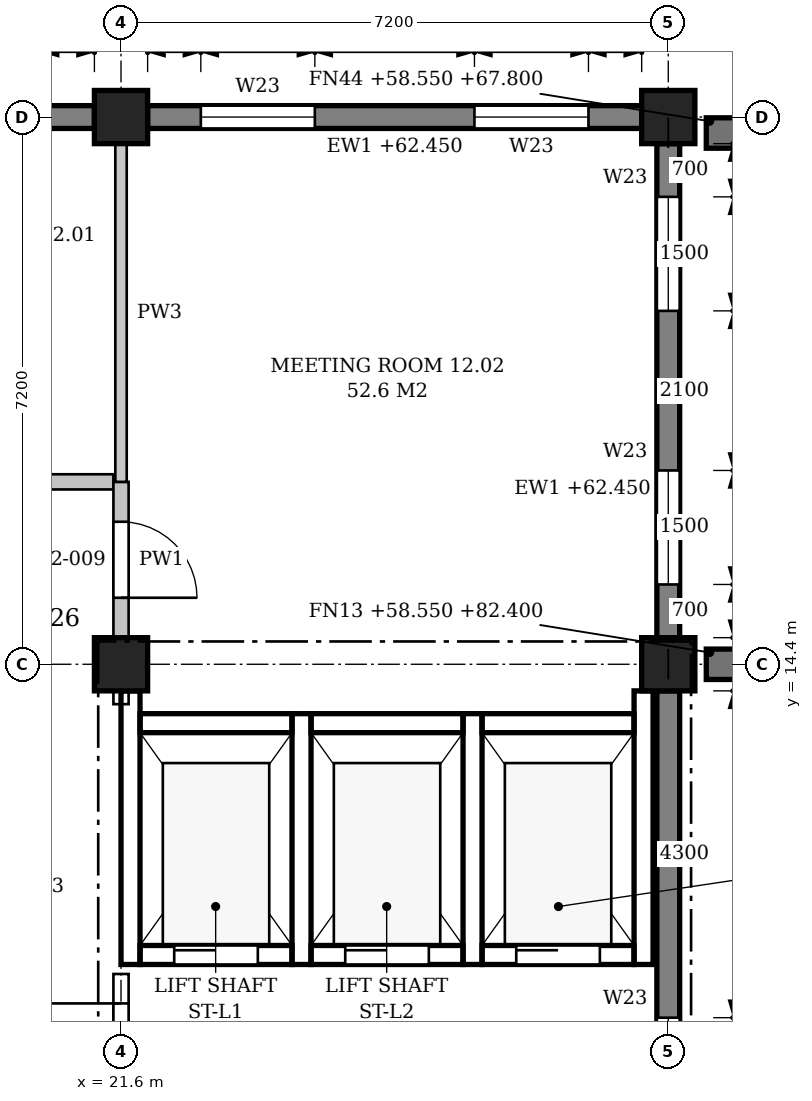
"""IFC4 building model, lengths in metres.
Left out: names, types, materials, properties, quantities, classifications, styles, units other than length and angle.
Written with IfcOpenShell. Run it as: python <this file> out.ifc"""

import sys

from ifc_helpers import new_model, si_unit, direction, frame, frame_2d, origin, origin_2d, place, context, subcontext, project, spatial, polyline, rectangle, outline, extrude, element, fill, save


model = new_model("IFC4")
c1 = context("Model", 3, precision=1e-05, world=origin(), true_north=direction((0.0, 1.0)))
c2 = subcontext(c1, "Body", "Model", "MODEL_VIEW")
j1 = project(units=[si_unit("LENGTHUNIT", "METRE"), si_unit("PLANEANGLEUNIT", "RADIAN")], contexts=[c1])
p1 = place(None, origin())
s1 = spatial("IfcSite", under=j1, at=p1, CompositionType="ELEMENT")
p2 = place(p1, origin())
s2 = spatial("IfcBuilding", under=s1, at=p2, CompositionType="ELEMENT")
p3 = place(p2, frame((0.0, 0.0, 58.8)))
s3 = spatial("IfcBuildingStorey", under=s2, at=p3, CompositionType="ELEMENT", Elevation=58.8)
for number, where, z_axis, x_axis in (
    (1, (21.6, 14.4, 0.0), (0.0, 0.0, 1.0), (1.0, 0.0, 0.0)),
    (2, (21.6, 21.6, 0.0), (0.0, 0.0, 1.0), (1.0, 0.0, 0.0)),
    (3, (28.8, 14.4, 0.0), (0.0, 0.0, 1.0), (1.0, 0.0, 0.0)),
    (4, (28.8, 21.6, 0.0), (0.0, 0.0, 1.0), (1.0, 0.0, 0.0)),
):
    element("IfcColumn", number, at=place(p3, frame(where, z_axis=z_axis, x_axis=x_axis)), inside=s3, PredefinedType="COLUMN", context=c2, shape_type="SweptSolid", body=[
        extrude(rectangle(XDim=0.7, YDim=0.7, at=origin_2d()), origin(), (0.0, 0.0, 1.0), 4.5),
    ])
p4 = place(p3, frame((28.8, 7.55, 0.0), z_axis=(0.0, 0.0, 1.0), x_axis=(0.0, 1.0, 0.0)))
e5 = element("IfcWall", 5, at=p4, inside=s3, PredefinedType="STANDARD", context=c2, shape_type="SweptSolid", body=[
    extrude(rectangle(XDim=6.5, YDim=0.3, at=frame_2d((3.25, 0.0))), origin(), (0.0, 0.0, 1.0), 3.65),
])
p5 = place(p4, frame((0.7, 0.0, 0.9)))
e6 = element("IfcOpeningElement", 6, at=p5, cuts=e5, PredefinedType="OPENING", context=c2, shape_type="SweptSolid", body=[
    extrude(outline(polyline([(0.0, 0.0), (1.5, 0.0), (1.5, 1.95), (0.75, 2.7), (0.0, 1.95), (0.0, 0.0)])), frame((0.0, 0.16, 0.0), z_axis=(0.0, -1.0, 0.0), x_axis=(1.0, 0.0, 0.0)), (0.0, 0.0, 1.0), 0.32),
])
p6 = place(p3, frame((28.8, 14.75, 0.0), z_axis=(0.0, 0.0, 1.0), x_axis=(0.0, 1.0, 0.0)))
e7 = element("IfcWall", 7, at=p6, inside=s3, PredefinedType="STANDARD", context=c2, shape_type="SweptSolid", body=[
    extrude(rectangle(XDim=6.5, YDim=0.3, at=frame_2d((3.25, 0.0))), origin(), (0.0, 0.0, 1.0), 3.65),
])
p7 = place(p6, frame((0.7, 0.0, 0.9)))
e8 = element("IfcOpeningElement", 8, at=p7, cuts=e7, PredefinedType="OPENING", context=c2, shape_type="SweptSolid", body=[
    extrude(outline(polyline([(0.0, 0.0), (1.5, 0.0), (1.5, 1.95), (0.75, 2.7), (0.0, 1.95), (0.0, 0.0)])), frame((0.0, 0.16, 0.0), z_axis=(0.0, -1.0, 0.0), x_axis=(1.0, 0.0, 0.0)), (0.0, 0.0, 1.0), 0.32),
])
p8 = place(p6, frame((4.3, 0.0, 0.9)))
e9 = element("IfcOpeningElement", 9, at=p8, cuts=e7, PredefinedType="OPENING", context=c2, shape_type="SweptSolid", body=[
    extrude(outline(polyline([(0.0, 0.0), (1.5, 0.0), (1.5, 1.95), (0.75, 2.7), (0.0, 1.95), (0.0, 0.0)])), frame((0.0, 0.16, 0.0), z_axis=(0.0, -1.0, 0.0), x_axis=(1.0, 0.0, 0.0)), (0.0, 0.0, 1.0), 0.32),
])
p9 = place(p3, frame((28.45, 21.6, 0.0), z_axis=(0.0, 0.0, 1.0), x_axis=(-1.0, 0.0, 0.0)))
e10 = element("IfcWall", 10, at=p9, inside=s3, PredefinedType="STANDARD", context=c2, shape_type="SweptSolid", body=[
    extrude(rectangle(XDim=6.5, YDim=0.3, at=frame_2d((3.25, 0.0))), origin(), (0.0, 0.0, 1.0), 3.65),
])
p10 = place(p9, frame((0.7, 0.0, 0.9)))
e11 = element("IfcOpeningElement", 11, at=p10, cuts=e10, PredefinedType="OPENING", context=c2, shape_type="SweptSolid", body=[
    extrude(outline(polyline([(0.0, 0.0), (1.5, 0.0), (1.5, 1.95), (0.75, 2.7), (0.0, 1.95), (0.0, 0.0)])), frame((0.0, 0.16, 0.0), z_axis=(0.0, -1.0, 0.0), x_axis=(1.0, 0.0, 0.0)), (0.0, 0.0, 1.0), 0.32),
])
p11 = place(p9, frame((4.3, 0.0, 0.9)))
e12 = element("IfcOpeningElement", 12, at=p11, cuts=e10, PredefinedType="OPENING", context=c2, shape_type="SweptSolid", body=[
    extrude(outline(polyline([(0.0, 0.0), (1.5, 0.0), (1.5, 1.95), (0.75, 2.7), (0.0, 1.95), (0.0, 0.0)])), frame((0.0, 0.16, 0.0), z_axis=(0.0, -1.0, 0.0), x_axis=(1.0, 0.0, 0.0)), (0.0, 0.0, 1.0), 0.32),
])
p12 = place(p3, frame((21.25, 21.6, 0.0), z_axis=(0.0, 0.0, 1.0), x_axis=(-1.0, 0.0, 0.0)))
e13 = element("IfcWall", 13, at=p12, inside=s3, PredefinedType="STANDARD", context=c2, shape_type="SweptSolid", body=[
    extrude(rectangle(XDim=6.5, YDim=0.3, at=frame_2d((3.25, 0.0))), origin(), (0.0, 0.0, 1.0), 3.65),
])
p13 = place(p12, frame((0.7, 0.0, 0.9)))
e14 = element("IfcOpeningElement", 14, at=p13, cuts=e13, PredefinedType="OPENING", context=c2, shape_type="SweptSolid", body=[
    extrude(outline(polyline([(0.0, 0.0), (1.5, 0.0), (1.5, 1.95), (0.75, 2.7), (0.0, 1.95), (0.0, 0.0)])), frame((0.0, 0.16, 0.0), z_axis=(0.0, -1.0, 0.0), x_axis=(1.0, 0.0, 0.0)), (0.0, 0.0, 1.0), 0.32),
])
p14 = place(p12, frame((4.3, 0.0, 0.9)))
e15 = element("IfcOpeningElement", 15, at=p14, cuts=e13, PredefinedType="OPENING", context=c2, shape_type="SweptSolid", body=[
    extrude(outline(polyline([(0.0, 0.0), (1.5, 0.0), (1.5, 1.95), (0.75, 2.7), (0.0, 1.95), (0.0, 0.0)])), frame((0.0, 0.16, 0.0), z_axis=(0.0, -1.0, 0.0), x_axis=(1.0, 0.0, 0.0)), (0.0, 0.0, 1.0), 0.32),
])
p15 = place(p3, frame((29.3, 14.4, -0.25), z_axis=(0.0, 0.0, 1.0), x_axis=(1.0, 0.0, 0.0)))
e16 = element("IfcWall", 16, at=p15, inside=s3, PredefinedType="POLYGONAL", context=c2, shape_type="SweptSolid", body=[
    extrude(outline(polyline([(0.5, 0.0), (0.5, 23.85), (0.0, 23.85), (0.0, 0.0), (0.5, 0.0)])), frame((0.0, 0.2, 0.0), z_axis=(0.0, -1.0, 0.0), x_axis=(1.0, 0.0, 0.0)), (0.0, 0.0, 1.0), 0.4),
])
p16 = place(p3, frame((29.3, 21.39, -0.25), z_axis=(0.0, 0.0, 1.0), x_axis=(1.0, 0.0, 0.0)))
e17 = element("IfcWall", 17, at=p16, inside=s3, PredefinedType="POLYGONAL", context=c2, shape_type="SweptSolid", body=[
    extrude(outline(polyline([(0.5, 0.0), (0.5, 8.725), (0.15, 9.25), (0.0, 9.25), (0.0, 0.0), (0.5, 0.0)])), frame((0.0, 0.2, 0.0), z_axis=(0.0, -1.0, 0.0), x_axis=(1.0, 0.0, 0.0)), (0.0, 0.0, 1.0), 0.4),
])
p17 = place(p3, frame((21.725, 10.45, -0.25), z_axis=(0.0, 0.0, 1.0), x_axis=(0.0, 1.0, 0.0)))
e18 = element("IfcWall", 18, at=p17, inside=s3, PredefinedType="SHEAR", context=c2, shape_type="SweptSolid", body=[
    extrude(rectangle(XDim=3.6, YDim=0.25, at=frame_2d((1.8, 0.0))), origin(), (0.0, 0.0, 1.0), 3.85),
])
for number, where, z_axis, x_axis in (
    (19, (23.975, 10.45, -0.25), (0.0, 0.0, 1.0), (0.0, 1.0, 0.0)),
    (20, (26.225, 10.45, -0.25), (0.0, 0.0, 1.0), (0.0, 1.0, 0.0)),
):
    element("IfcWall", number, at=place(p3, frame(where, z_axis=z_axis, x_axis=x_axis)), inside=s3, PredefinedType="SHEAR", context=c2, shape_type="SweptSolid", body=[
        extrude(rectangle(XDim=3.3, YDim=0.25, at=frame_2d((1.65, 0.0))), origin(), (0.0, 0.0, 1.0), 4.5),
    ])
p18 = place(p3, frame((28.475, 10.45, -0.25), z_axis=(0.0, 0.0, 1.0), x_axis=(0.0, 1.0, 0.0)))
e21 = element("IfcWall", 21, at=p18, inside=s3, PredefinedType="SHEAR", context=c2, shape_type="SweptSolid", body=[
    extrude(rectangle(XDim=3.6, YDim=0.25, at=frame_2d((1.8, 0.0))), origin(), (0.0, 0.0, 1.0), 4.5),
])
p19 = place(p3, frame((21.85, 10.575, -0.25), z_axis=(0.0, 0.0, 1.0), x_axis=(1.0, 0.0, 0.0)))
e22 = element("IfcWall", 22, at=p19, inside=s3, PredefinedType="SHEAR", context=c2, shape_type="SweptSolid", body=[
    extrude(rectangle(XDim=2.0, YDim=0.25, at=frame_2d((1.0, 0.0))), origin(), (0.0, 0.0, 1.0), 4.5),
])
p20 = place(p19, frame((0.45, 0.0, 0.25)))
e23 = element("IfcOpeningElement", 23, at=p20, cuts=e22, PredefinedType="OPENING", context=c2, shape_type="SweptSolid", body=[
    extrude(rectangle(XDim=1.1, YDim=2.1, at=frame_2d((0.55, 1.05))), frame((0.0, 0.135, 0.0), z_axis=(0.0, -1.0, 0.0), x_axis=(1.0, 0.0, 0.0)), (0.0, 0.0, 1.0), 0.27),
])
p21 = place(p3, frame((21.85, 13.625, -0.25), z_axis=(0.0, 0.0, 1.0), x_axis=(1.0, 0.0, 0.0)))
e24 = element("IfcWall", 24, at=p21, inside=s3, PredefinedType="SHEAR", context=c2, shape_type="SweptSolid", body=[
    extrude(rectangle(XDim=2.0, YDim=0.25, at=frame_2d((1.0, 0.0))), origin(), (0.0, 0.0, 1.0), 4.5),
])
p22 = place(p3, frame((24.1, 10.575, -0.25), z_axis=(0.0, 0.0, 1.0), x_axis=(1.0, 0.0, 0.0)))
e25 = element("IfcWall", 25, at=p22, inside=s3, PredefinedType="SHEAR", context=c2, shape_type="SweptSolid", body=[
    extrude(rectangle(XDim=2.0, YDim=0.25, at=frame_2d((1.0, 0.0))), origin(), (0.0, 0.0, 1.0), 4.5),
])
p23 = place(p22, frame((0.45, 0.0, 0.25)))
e26 = element("IfcOpeningElement", 26, at=p23, cuts=e25, PredefinedType="OPENING", context=c2, shape_type="SweptSolid", body=[
    extrude(rectangle(XDim=1.1, YDim=2.1, at=frame_2d((0.55, 1.05))), frame((0.0, 0.135, 0.0), z_axis=(0.0, -1.0, 0.0), x_axis=(1.0, 0.0, 0.0)), (0.0, 0.0, 1.0), 0.27),
])
p24 = place(p3, frame((24.1, 13.625, -0.25), z_axis=(0.0, 0.0, 1.0), x_axis=(1.0, 0.0, 0.0)))
e27 = element("IfcWall", 27, at=p24, inside=s3, PredefinedType="SHEAR", context=c2, shape_type="SweptSolid", body=[
    extrude(rectangle(XDim=2.0, YDim=0.25, at=frame_2d((1.0, 0.0))), origin(), (0.0, 0.0, 1.0), 4.5),
])
p25 = place(p3, frame((26.35, 10.575, -0.25), z_axis=(0.0, 0.0, 1.0), x_axis=(1.0, 0.0, 0.0)))
e28 = element("IfcWall", 28, at=p25, inside=s3, PredefinedType="SHEAR", context=c2, shape_type="SweptSolid", body=[
    extrude(rectangle(XDim=2.0, YDim=0.25, at=frame_2d((1.0, 0.0))), origin(), (0.0, 0.0, 1.0), 4.5),
])
p26 = place(p25, frame((0.45, 0.0, 0.25)))
e29 = element("IfcOpeningElement", 29, at=p26, cuts=e28, PredefinedType="OPENING", context=c2, shape_type="SweptSolid", body=[
    extrude(rectangle(XDim=1.1, YDim=2.1, at=frame_2d((0.55, 1.05))), frame((0.0, 0.135, 0.0), z_axis=(0.0, -1.0, 0.0), x_axis=(1.0, 0.0, 0.0)), (0.0, 0.0, 1.0), 0.27),
])
p27 = place(p3, frame((26.35, 13.625, -0.25), z_axis=(0.0, 0.0, 1.0), x_axis=(1.0, 0.0, 0.0)))
e30 = element("IfcWall", 30, at=p27, inside=s3, PredefinedType="SHEAR", context=c2, shape_type="SweptSolid", body=[
    extrude(rectangle(XDim=2.0, YDim=0.25, at=frame_2d((1.0, 0.0))), origin(), (0.0, 0.0, 1.0), 4.5),
])
p28 = place(p3, frame((18.1, 16.8, 0.0), z_axis=(0.0, 0.0, 1.0), x_axis=(1.0, 0.0, 0.0)))
e31 = element("IfcWall", 31, at=p28, inside=s3, PredefinedType="PARTITIONING", context=c2, shape_type="SweptSolid", body=[
    extrude(outline(polyline([(0.0, 0.0), (3.4, 0.0), (3.4, 3.6), (3.3, 3.6), (3.3, 4.25), (0.0, 4.25), (0.0, 0.0)])), frame((0.0, 0.1, 0.0), z_axis=(0.0, -1.0, 0.0), x_axis=(1.0, 0.0, 0.0)), (0.0, 0.0, 1.0), 0.2),
])
p29 = place(p28, frame((1.2, 0.0, 0.0)))
e32 = element("IfcOpeningElement", 32, at=p29, cuts=e31, PredefinedType="OPENING", context=c2, shape_type="SweptSolid", body=[
    extrude(rectangle(XDim=1.0, YDim=2.1, at=frame_2d((0.5, 1.05))), frame((0.0, 0.11, 0.0), z_axis=(0.0, -1.0, 0.0), x_axis=(1.0, 0.0, 0.0)), (0.0, 0.0, 1.0), 0.22),
])
p30 = place(p3, frame((21.6, 7.55, 0.0), z_axis=(0.0, 0.0, 1.0), x_axis=(0.0, 1.0, 0.0)))
e33 = element("IfcWall", 33, at=p30, inside=s3, PredefinedType="PARTITIONING", context=c2, shape_type="SweptSolid", body=[
    extrude(rectangle(XDim=2.775, YDim=0.2, at=frame_2d((1.387, 0.0))), origin(), (0.0, 0.0, 1.0), 3.6),
])
p31 = place(p30, frame((0.387, 0.0, 0.0)))
e34 = element("IfcOpeningElement", 34, at=p31, cuts=e33, PredefinedType="OPENING", context=c2, shape_type="SweptSolid", body=[
    extrude(rectangle(XDim=2.0, YDim=2.4, at=frame_2d((1.0, 1.2))), frame((0.0, 0.11, 0.0), z_axis=(0.0, -1.0, 0.0), x_axis=(1.0, 0.0, 0.0)), (0.0, 0.0, 1.0), 0.22),
])
p32 = place(p3, frame((21.6, 13.875, 0.0), z_axis=(0.0, 0.0, 1.0), x_axis=(0.0, 1.0, 0.0)))
e35 = element("IfcWall", 35, at=p32, inside=s3, PredefinedType="PARTITIONING", context=c2, shape_type="SweptSolid", body=[
    extrude(rectangle(XDim=0.175, YDim=0.2, at=frame_2d((0.087, 0.0))), origin(), (0.0, 0.0, 1.0), 3.6),
])
p33 = place(p3, frame((21.6, 14.75, 0.0), z_axis=(0.0, 0.0, 1.0), x_axis=(0.0, 1.0, 0.0)))
e36 = element("IfcWall", 36, at=p33, inside=s3, PredefinedType="PARTITIONING", context=c2, shape_type="SweptSolid", body=[
    extrude(rectangle(XDim=2.05, YDim=0.2, at=frame_2d((1.025, 0.0))), origin(), (0.0, 0.0, 1.0), 3.6),
])
p34 = place(p33, frame((0.525, 0.0, 0.0)))
e37 = element("IfcOpeningElement", 37, at=p34, cuts=e36, PredefinedType="OPENING", context=c2, shape_type="SweptSolid", body=[
    extrude(rectangle(XDim=1.0, YDim=2.1, at=frame_2d((0.5, 1.05))), frame((0.0, 0.11, 0.0), z_axis=(0.0, -1.0, 0.0), x_axis=(1.0, 0.0, 0.0)), (0.0, 0.0, 1.0), 0.22),
])
p35 = place(p3, frame((21.6, 16.8, 0.0), z_axis=(0.0, 0.0, 1.0), x_axis=(0.0, 1.0, 0.0)))
e38 = element("IfcWall", 38, at=p35, inside=s3, PredefinedType="PARTITIONING", context=c2, shape_type="SweptSolid", body=[
    extrude(rectangle(XDim=4.45, YDim=0.15, at=frame_2d((2.225, 0.0))), origin(), (0.0, 0.0, 1.0), 3.6),
])
p36 = place(p5, origin())
e39 = element("IfcWindow", 39, at=p36, inside=s3, PartitioningType="SINGLE_PANEL", PredefinedType="WINDOW", context=c2, shape_type="SweptSolid", body=[
    extrude(outline(polyline([(0.0, 0.0), (1.5, 0.0), (1.5, 1.95), (0.75, 2.7), (0.0, 1.95), (0.0, 0.0)])), frame((0.0, 0.03, 0.0), z_axis=(0.0, -1.0, 0.0), x_axis=(1.0, 0.0, 0.0)), (0.0, 0.0, 1.0), 0.06),
])
fill(e6, e39)
p37 = place(p7, origin())
e40 = element("IfcWindow", 40, at=p37, inside=s3, PartitioningType="SINGLE_PANEL", PredefinedType="WINDOW", context=c2, shape_type="SweptSolid", body=[
    extrude(outline(polyline([(0.0, 0.0), (1.5, 0.0), (1.5, 1.95), (0.75, 2.7), (0.0, 1.95), (0.0, 0.0)])), frame((0.0, 0.03, 0.0), z_axis=(0.0, -1.0, 0.0), x_axis=(1.0, 0.0, 0.0)), (0.0, 0.0, 1.0), 0.06),
])
fill(e8, e40)
p38 = place(p8, origin())
e41 = element("IfcWindow", 41, at=p38, inside=s3, PartitioningType="SINGLE_PANEL", PredefinedType="WINDOW", context=c2, shape_type="SweptSolid", body=[
    extrude(outline(polyline([(0.0, 0.0), (1.5, 0.0), (1.5, 1.95), (0.75, 2.7), (0.0, 1.95), (0.0, 0.0)])), frame((0.0, 0.03, 0.0), z_axis=(0.0, -1.0, 0.0), x_axis=(1.0, 0.0, 0.0)), (0.0, 0.0, 1.0), 0.06),
])
fill(e9, e41)
p39 = place(p10, origin())
e42 = element("IfcWindow", 42, at=p39, inside=s3, PartitioningType="SINGLE_PANEL", PredefinedType="WINDOW", context=c2, shape_type="SweptSolid", body=[
    extrude(outline(polyline([(0.0, 0.0), (1.5, 0.0), (1.5, 1.95), (0.75, 2.7), (0.0, 1.95), (0.0, 0.0)])), frame((0.0, 0.03, 0.0), z_axis=(0.0, -1.0, 0.0), x_axis=(1.0, 0.0, 0.0)), (0.0, 0.0, 1.0), 0.06),
])
fill(e11, e42)
p40 = place(p11, origin())
e43 = element("IfcWindow", 43, at=p40, inside=s3, PartitioningType="SINGLE_PANEL", PredefinedType="WINDOW", context=c2, shape_type="SweptSolid", body=[
    extrude(outline(polyline([(0.0, 0.0), (1.5, 0.0), (1.5, 1.95), (0.75, 2.7), (0.0, 1.95), (0.0, 0.0)])), frame((0.0, 0.03, 0.0), z_axis=(0.0, -1.0, 0.0), x_axis=(1.0, 0.0, 0.0)), (0.0, 0.0, 1.0), 0.06),
])
fill(e12, e43)
p41 = place(p20, origin())
e44 = element("IfcDoor", 44, at=p41, inside=s3, OperationType="SLIDING_TO_LEFT", PredefinedType="DOOR", context=c2, shape_type="SweptSolid", body=[
    extrude(rectangle(XDim=1.1, YDim=2.1, at=frame_2d((0.55, 1.05))), frame((0.0, 0.025, 0.0), z_axis=(0.0, -1.0, 0.0), x_axis=(1.0, 0.0, 0.0)), (0.0, 0.0, 1.0), 0.05),
])
fill(e23, e44)
p42 = place(p23, origin())
e45 = element("IfcDoor", 45, at=p42, inside=s3, OperationType="SLIDING_TO_LEFT", PredefinedType="DOOR", context=c2, shape_type="SweptSolid", body=[
    extrude(rectangle(XDim=1.1, YDim=2.1, at=frame_2d((0.55, 1.05))), frame((0.0, 0.025, 0.0), z_axis=(0.0, -1.0, 0.0), x_axis=(1.0, 0.0, 0.0)), (0.0, 0.0, 1.0), 0.05),
])
fill(e26, e45)
p43 = place(p26, origin())
e46 = element("IfcDoor", 46, at=p43, inside=s3, OperationType="SLIDING_TO_LEFT", PredefinedType="DOOR", context=c2, shape_type="SweptSolid", body=[
    extrude(rectangle(XDim=1.1, YDim=2.1, at=frame_2d((0.55, 1.05))), frame((0.0, 0.025, 0.0), z_axis=(0.0, -1.0, 0.0), x_axis=(1.0, 0.0, 0.0)), (0.0, 0.0, 1.0), 0.05),
])
fill(e29, e46)
p44 = place(p31, origin())
e47 = element("IfcDoor", 47, at=p44, inside=s3, OperationType="DOUBLE_DOOR_SINGLE_SWING", PredefinedType="DOOR", context=c2, shape_type="SweptSolid", body=[
    extrude(rectangle(XDim=2.0, YDim=2.4, at=frame_2d((1.0, 1.2))), frame((0.0, 0.025, 0.0), z_axis=(0.0, -1.0, 0.0), x_axis=(1.0, 0.0, 0.0)), (0.0, 0.0, 1.0), 0.05),
])
fill(e34, e47)
p45 = place(p34, frame((1.0, 0.0, 0.0), z_axis=(0.0, 0.0, 1.0), x_axis=(-1.0, 0.0, 0.0)))
e48 = element("IfcDoor", 48, at=p45, inside=s3, OperationType="SINGLE_SWING_RIGHT", PredefinedType="DOOR", context=c2, shape_type="SweptSolid", body=[
    extrude(rectangle(XDim=1.0, YDim=2.1, at=frame_2d((0.5, 1.05))), frame((0.0, 0.025, 0.0), z_axis=(0.0, -1.0, 0.0), x_axis=(1.0, 0.0, 0.0)), (0.0, 0.0, 1.0), 0.05),
])
fill(e37, e48)
save(model, sys.argv[1])
